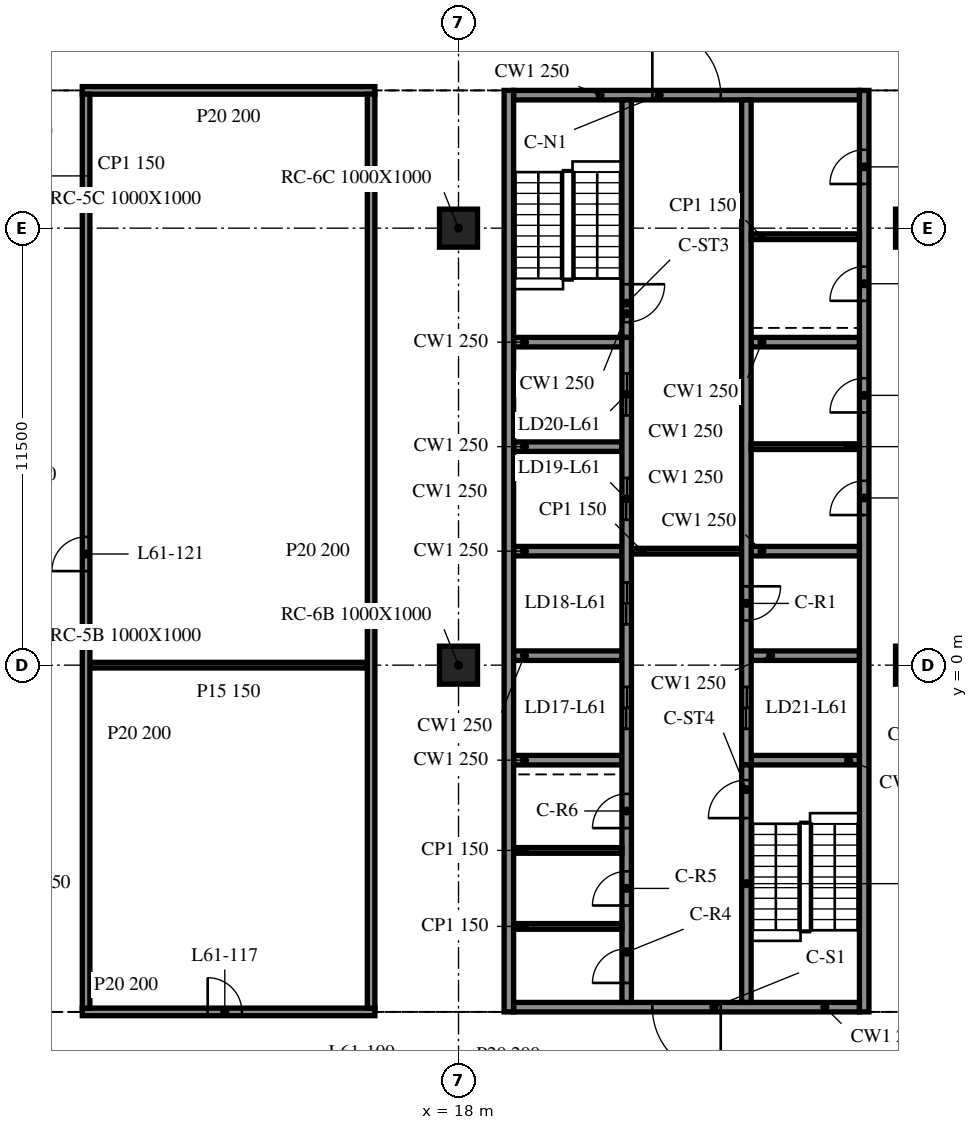
"""IFC4 building model, lengths in metres.
Left out: names, types, materials, properties, quantities, classifications, styles, units other than length and angle.
Written with IfcOpenShell. Run it as: python <this file> out.ifc"""

import sys

from ifc_helpers import new_model, si_unit, direction, frame, frame_2d, origin, origin_2d, place, context, subcontext, project, spatial, rectangle, extrude, element, fill, save


model = new_model("IFC4")
c1 = context("Model", 3, precision=1e-05, world=origin(), true_north=direction((0.0, 1.0)))
c2 = subcontext(c1, "Body", "Model", "MODEL_VIEW")
j1 = project(units=[si_unit("LENGTHUNIT", "METRE"), si_unit("PLANEANGLEUNIT", "RADIAN")], contexts=[c1])
p1 = place(None, origin())
s1 = spatial("IfcSite", under=j1, at=p1, CompositionType="ELEMENT")
p2 = place(p1, origin())
s2 = spatial("IfcBuilding", under=s1, at=p2, CompositionType="ELEMENT")
p3 = place(p2, frame((0.0, 0.0, 251.4)))
s3 = spatial("IfcBuildingStorey", under=s2, at=p3, CompositionType="ELEMENT", Elevation=251.4)
for number, where, z_axis, x_axis in (
    (1, (18.0, 0.0, -0.34), (0.0, 0.0, 1.0), (1.0, 0.0, 0.0)),
    (2, (18.0, 11.5, -0.34), (0.0, 0.0, 1.0), (1.0, 0.0, 0.0)),
    (3, (30.0, 0.0, -0.34), (0.0, 0.0, 1.0), (1.0, 0.0, 0.0)),
    (4, (30.0, 11.5, -0.34), (0.0, 0.0, 1.0), (1.0, 0.0, 0.0)),
):
    element("IfcColumn", number, at=place(p3, frame(where, z_axis=z_axis, x_axis=x_axis)), inside=s3, PredefinedType="COLUMN", context=c2, shape_type="SweptSolid", body=[
        extrude(rectangle(XDim=1.0, YDim=1.0, at=origin_2d()), origin(), (0.0, 0.0, 1.0), 3.8),
    ])
p4 = place(p3, frame((19.325, 15.125, 0.0), z_axis=(0.0, 0.0, 1.0), x_axis=(0.0, -1.0, 0.0)))
e5 = element("IfcWall", 5, at=p4, inside=s3, PredefinedType="SOLIDWALL", context=c2, shape_type="SweptSolid", body=[
    extrude(rectangle(XDim=24.25, YDim=0.25, at=frame_2d((12.125, 0.0))), origin(), (0.0, 0.0, 1.0), 3.46),
])
p5 = place(p3, frame((28.675, -9.125, 0.0), z_axis=(0.0, 0.0, 1.0), x_axis=(0.0, 1.0, 0.0)))
e6 = element("IfcWall", 6, at=p5, inside=s3, PredefinedType="SOLIDWALL", context=c2, shape_type="SweptSolid", body=[
    extrude(rectangle(XDim=24.25, YDim=0.25, at=frame_2d((12.125, 0.0))), origin(), (0.0, 0.0, 1.0), 3.46),
])
p6 = place(p5, frame((13.075, 0.0, 0.0)))
e7 = element("IfcOpeningElement", 7, at=p6, cuts=e6, PredefinedType="OPENING", context=c2, shape_type="SweptSolid", body=[
    extrude(rectangle(XDim=0.9, YDim=2.1, at=frame_2d((0.45, 1.05))), frame((0.0, 0.135, 0.0), z_axis=(0.0, -1.0, 0.0), x_axis=(1.0, 0.0, 0.0)), (0.0, 0.0, 1.0), 0.27),
])
p7 = place(p5, frame((15.775, 0.0, 0.0)))
e8 = element("IfcOpeningElement", 8, at=p7, cuts=e6, PredefinedType="OPENING", context=c2, shape_type="SweptSolid", body=[
    extrude(rectangle(XDim=0.9, YDim=2.1, at=frame_2d((0.45, 1.05))), frame((0.0, 0.135, 0.0), z_axis=(0.0, -1.0, 0.0), x_axis=(1.0, 0.0, 0.0)), (0.0, 0.0, 1.0), 0.27),
])
p8 = place(p5, frame((18.712, 0.0, 0.0)))
e9 = element("IfcOpeningElement", 9, at=p8, cuts=e6, PredefinedType="OPENING", context=c2, shape_type="SweptSolid", body=[
    extrude(rectangle(XDim=0.9, YDim=2.1, at=frame_2d((0.45, 1.05))), frame((0.0, 0.135, 0.0), z_axis=(0.0, -1.0, 0.0), x_axis=(1.0, 0.0, 0.0)), (0.0, 0.0, 1.0), 0.27),
])
p9 = place(p5, frame((21.788, 0.0, 0.0)))
e10 = element("IfcOpeningElement", 10, at=p9, cuts=e6, PredefinedType="OPENING", context=c2, shape_type="SweptSolid", body=[
    extrude(rectangle(XDim=0.9, YDim=2.1, at=frame_2d((0.45, 1.05))), frame((0.0, 0.135, 0.0), z_axis=(0.0, -1.0, 0.0), x_axis=(1.0, 0.0, 0.0)), (0.0, 0.0, 1.0), 0.27),
])
p10 = place(p3, frame((28.55, -9.0, 0.0), z_axis=(0.0, 0.0, 1.0), x_axis=(-1.0, 0.0, 0.0)))
e11 = element("IfcWall", 11, at=p10, inside=s3, PredefinedType="SOLIDWALL", context=c2, shape_type="SweptSolid", body=[
    extrude(rectangle(XDim=9.1, YDim=0.25, at=frame_2d((4.55, 0.0))), origin(), (0.0, 0.0, 1.0), 3.46),
])
p11 = place(p10, frame((3.65, 0.0, 0.0)))
e12 = element("IfcOpeningElement", 12, at=p11, cuts=e11, PredefinedType="OPENING", context=c2, shape_type="SweptSolid", body=[
    extrude(rectangle(XDim=1.8, YDim=2.1, at=frame_2d((0.9, 1.05))), frame((0.0, 0.135, 0.0), z_axis=(0.0, -1.0, 0.0), x_axis=(1.0, 0.0, 0.0)), (0.0, 0.0, 1.0), 0.27),
])
p12 = place(p3, frame((19.45, 15.0, 0.0), z_axis=(0.0, 0.0, 1.0), x_axis=(1.0, 0.0, 0.0)))
e13 = element("IfcWall", 13, at=p12, inside=s3, PredefinedType="SOLIDWALL", context=c2, shape_type="SweptSolid", body=[
    extrude(rectangle(XDim=9.1, YDim=0.25, at=frame_2d((4.55, 0.0))), origin(), (0.0, 0.0, 1.0), 3.46),
])
p13 = place(p12, frame((3.65, 0.0, 0.0)))
e14 = element("IfcOpeningElement", 14, at=p13, cuts=e13, PredefinedType="OPENING", context=c2, shape_type="SweptSolid", body=[
    extrude(rectangle(XDim=1.8, YDim=2.1, at=frame_2d((0.9, 1.05))), frame((0.0, 0.135, 0.0), z_axis=(0.0, -1.0, 0.0), x_axis=(1.0, 0.0, 0.0)), (0.0, 0.0, 1.0), 0.27),
])
p14 = place(p3, frame((22.425, -8.875, 0.0), z_axis=(0.0, 0.0, 1.0), x_axis=(0.0, 1.0, 0.0)))
e15 = element("IfcWall", 15, at=p14, inside=s3, PredefinedType="SOLIDWALL", context=c2, shape_type="SweptSolid", body=[
    extrude(rectangle(XDim=17.5, YDim=0.25, at=frame_2d((8.75, 0.0))), origin(), (0.0, 0.0, 1.0), 3.46),
])
p15 = place(p14, frame((7.2, 0.0, 0.0)))
e16 = element("IfcOpeningElement", 16, at=p15, cuts=e15, PredefinedType="OPENING", context=c2, shape_type="SweptSolid", body=[
    extrude(rectangle(XDim=1.1, YDim=2.1, at=frame_2d((0.55, 1.05))), frame((0.0, 0.135, 0.0), z_axis=(0.0, -1.0, 0.0), x_axis=(1.0, 0.0, 0.0)), (0.0, 0.0, 1.0), 0.27),
])
p16 = place(p14, frame((9.95, 0.0, 0.0)))
e17 = element("IfcOpeningElement", 17, at=p16, cuts=e15, PredefinedType="OPENING", context=c2, shape_type="SweptSolid", body=[
    extrude(rectangle(XDim=1.1, YDim=2.1, at=frame_2d((0.55, 1.05))), frame((0.0, 0.135, 0.0), z_axis=(0.0, -1.0, 0.0), x_axis=(1.0, 0.0, 0.0)), (0.0, 0.0, 1.0), 0.27),
])
p17 = place(p14, frame((12.7, 0.0, 0.0)))
e18 = element("IfcOpeningElement", 18, at=p17, cuts=e15, PredefinedType="OPENING", context=c2, shape_type="SweptSolid", body=[
    extrude(rectangle(XDim=1.1, YDim=2.1, at=frame_2d((0.55, 1.05))), frame((0.0, 0.135, 0.0), z_axis=(0.0, -1.0, 0.0), x_axis=(1.0, 0.0, 0.0)), (0.0, 0.0, 1.0), 0.27),
])
p18 = place(p14, frame((15.45, 0.0, 0.0)))
e19 = element("IfcOpeningElement", 19, at=p18, cuts=e15, PredefinedType="OPENING", context=c2, shape_type="SweptSolid", body=[
    extrude(rectangle(XDim=1.1, YDim=2.1, at=frame_2d((0.55, 1.05))), frame((0.0, 0.135, 0.0), z_axis=(0.0, -1.0, 0.0), x_axis=(1.0, 0.0, 0.0)), (0.0, 0.0, 1.0), 0.27),
])
p19 = place(p14, frame((0.512, 0.0, 0.0)))
e20 = element("IfcOpeningElement", 20, at=p19, cuts=e15, PredefinedType="OPENING", context=c2, shape_type="SweptSolid", body=[
    extrude(rectangle(XDim=0.9, YDim=2.1, at=frame_2d((0.45, 1.05))), frame((0.0, 0.135, 0.0), z_axis=(0.0, -1.0, 0.0), x_axis=(1.0, 0.0, 0.0)), (0.0, 0.0, 1.0), 0.27),
])
p20 = place(p14, frame((2.55, 0.0, 0.0)))
e21 = element("IfcOpeningElement", 21, at=p20, cuts=e15, PredefinedType="OPENING", context=c2, shape_type="SweptSolid", body=[
    extrude(rectangle(XDim=0.9, YDim=2.1, at=frame_2d((0.45, 1.05))), frame((0.0, 0.135, 0.0), z_axis=(0.0, -1.0, 0.0), x_axis=(1.0, 0.0, 0.0)), (0.0, 0.0, 1.0), 0.27),
])
p21 = place(p14, frame((4.587, 0.0, 0.0)))
e22 = element("IfcOpeningElement", 22, at=p21, cuts=e15, PredefinedType="OPENING", context=c2, shape_type="SweptSolid", body=[
    extrude(rectangle(XDim=0.9, YDim=2.1, at=frame_2d((0.45, 1.05))), frame((0.0, 0.135, 0.0), z_axis=(0.0, -1.0, 0.0), x_axis=(1.0, 0.0, 0.0)), (0.0, 0.0, 1.0), 0.27),
])
p22 = place(p3, frame((22.425, 14.875, 0.0), z_axis=(0.0, 0.0, 1.0), x_axis=(0.0, -1.0, 0.0)))
e23 = element("IfcWall", 23, at=p22, inside=s3, PredefinedType="SOLIDWALL", context=c2, shape_type="SweptSolid", body=[
    extrude(rectangle(XDim=6.25, YDim=0.25, at=frame_2d((3.125, 0.0))), origin(), (0.0, 0.0, 1.0), 3.46),
])
p23 = place(p22, frame((4.85, 0.0, 0.0)))
e24 = element("IfcOpeningElement", 24, at=p23, cuts=e23, PredefinedType="OPENING", context=c2, shape_type="SweptSolid", body=[
    extrude(rectangle(XDim=1.0, YDim=2.1, at=frame_2d((0.5, 1.05))), frame((0.0, 0.135, 0.0), z_axis=(0.0, -1.0, 0.0), x_axis=(1.0, 0.0, 0.0)), (0.0, 0.0, 1.0), 0.27),
])
p24 = place(p3, frame((25.575, -8.875, 0.0), z_axis=(0.0, 0.0, 1.0), x_axis=(0.0, 1.0, 0.0)))
e25 = element("IfcWall", 25, at=p24, inside=s3, PredefinedType="SOLIDWALL", context=c2, shape_type="SweptSolid", body=[
    extrude(rectangle(XDim=6.25, YDim=0.25, at=frame_2d((3.125, 0.0))), origin(), (0.0, 0.0, 1.0), 3.46),
])
p25 = place(p24, frame((4.85, 0.0, 0.0)))
e26 = element("IfcOpeningElement", 26, at=p25, cuts=e25, PredefinedType="OPENING", context=c2, shape_type="SweptSolid", body=[
    extrude(rectangle(XDim=1.0, YDim=2.1, at=frame_2d((0.5, 1.05))), frame((0.0, 0.135, 0.0), z_axis=(0.0, -1.0, 0.0), x_axis=(1.0, 0.0, 0.0)), (0.0, 0.0, 1.0), 0.27),
])
p26 = place(p3, frame((25.575, 14.875, 0.0), z_axis=(0.0, 0.0, 1.0), x_axis=(0.0, -1.0, 0.0)))
e27 = element("IfcWall", 27, at=p26, inside=s3, PredefinedType="SOLIDWALL", context=c2, shape_type="SweptSolid", body=[
    extrude(rectangle(XDim=17.5, YDim=0.25, at=frame_2d((8.75, 0.0))), origin(), (0.0, 0.0, 1.0), 3.46),
])
p27 = place(p26, frame((15.45, 0.0, 0.0)))
e28 = element("IfcOpeningElement", 28, at=p27, cuts=e27, PredefinedType="OPENING", context=c2, shape_type="SweptSolid", body=[
    extrude(rectangle(XDim=1.1, YDim=2.1, at=frame_2d((0.55, 1.05))), frame((0.0, 0.135, 0.0), z_axis=(0.0, -1.0, 0.0), x_axis=(1.0, 0.0, 0.0)), (0.0, 0.0, 1.0), 0.27),
])
p28 = place(p26, frame((12.8, 0.0, 0.0)))
e29 = element("IfcOpeningElement", 29, at=p28, cuts=e27, PredefinedType="OPENING", context=c2, shape_type="SweptSolid", body=[
    extrude(rectangle(XDim=0.9, YDim=2.1, at=frame_2d((0.45, 1.05))), frame((0.0, 0.135, 0.0), z_axis=(0.0, -1.0, 0.0), x_axis=(1.0, 0.0, 0.0)), (0.0, 0.0, 1.0), 0.27),
])
for number, where, z_axis, x_axis in (
    (30, (19.45, -2.5, 0.0), (0.0, 0.0, 1.0), (1.0, 0.0, 0.0)),
    (31, (19.45, 0.25, 0.0), (0.0, 0.0, 1.0), (1.0, 0.0, 0.0)),
    (32, (19.45, 3.0, 0.0), (0.0, 0.0, 1.0), (1.0, 0.0, 0.0)),
    (33, (19.45, 5.75, 0.0), (0.0, 0.0, 1.0), (1.0, 0.0, 0.0)),
    (34, (19.45, 8.5, 0.0), (0.0, 0.0, 1.0), (1.0, 0.0, 0.0)),
    (35, (25.7, -2.5, 0.0), (0.0, 0.0, 1.0), (1.0, 0.0, 0.0)),
    (36, (25.7, 0.25, 0.0), (0.0, 0.0, 1.0), (1.0, 0.0, 0.0)),
    (37, (25.7, 3.0, 0.0), (0.0, 0.0, 1.0), (1.0, 0.0, 0.0)),
    (38, (25.7, 8.5, 0.0), (0.0, 0.0, 1.0), (1.0, 0.0, 0.0)),
):
    element("IfcWall", number, at=place(p3, frame(where, z_axis=z_axis, x_axis=x_axis)), inside=s3, PredefinedType="SOLIDWALL", context=c2, shape_type="SweptSolid", body=[
        extrude(rectangle(XDim=2.85, YDim=0.25, at=frame_2d((1.425, 0.0))), origin(), (0.0, 0.0, 1.0), 3.46),
    ])
p29 = place(p3, frame((22.55, 3.0, 0.0), z_axis=(0.0, 0.0, 1.0), x_axis=(1.0, 0.0, 0.0)))
e39 = element("IfcWall", 39, at=p29, inside=s3, PredefinedType="PARTITIONING", context=c2, shape_type="SweptSolid", body=[
    extrude(rectangle(XDim=2.9, YDim=0.15, at=frame_2d((1.45, 0.0))), origin(), (0.0, 0.0, 1.0), 3.46),
])
for number, where, z_axis, x_axis in (
    (40, (25.7, 5.75, 0.0), (0.0, 0.0, 1.0), (1.0, 0.0, 0.0)),
    (41, (19.45, -6.875, 0.0), (0.0, 0.0, 1.0), (1.0, 0.0, 0.0)),
    (42, (19.45, -4.875, 0.0), (0.0, 0.0, 1.0), (1.0, 0.0, 0.0)),
    (43, (25.7, 11.275, 0.0), (0.0, 0.0, 1.0), (1.0, 0.0, 0.0)),
):
    element("IfcWall", number, at=place(p3, frame(where, z_axis=z_axis, x_axis=x_axis)), inside=s3, PredefinedType="PARTITIONING", context=c2, shape_type="SweptSolid", body=[
        extrude(rectangle(XDim=2.85, YDim=0.15, at=frame_2d((1.425, 0.0))), origin(), (0.0, 0.0, 1.0), 3.46),
    ])
p30 = place(p3, frame((8.1, -9.125, 0.0), z_axis=(0.0, 0.0, 1.0), x_axis=(1.0, 0.0, 0.0)))
e44 = element("IfcWall", 44, at=p30, inside=s3, PredefinedType="PARTITIONING", context=c2, shape_type="SweptSolid", body=[
    extrude(rectangle(XDim=7.7, YDim=0.2, at=frame_2d((3.85, 0.0))), origin(), (0.0, 0.0, 1.0), 3.46),
])
p31 = place(p30, frame((3.3, 0.0, 0.0)))
e45 = element("IfcOpeningElement", 45, at=p31, cuts=e44, PredefinedType="OPENING", context=c2, shape_type="SweptSolid", body=[
    extrude(rectangle(XDim=0.9, YDim=2.1, at=frame_2d((0.45, 1.05))), frame((0.0, 0.11, 0.0), z_axis=(0.0, -1.0, 0.0), x_axis=(1.0, 0.0, 0.0)), (0.0, 0.0, 1.0), 0.22),
])
p32 = place(p3, frame((8.3, 0.0, 0.0), z_axis=(0.0, 0.0, 1.0), x_axis=(1.0, 0.0, 0.0)))
e46 = element("IfcWall", 46, at=p32, inside=s3, PredefinedType="PARTITIONING", context=c2, shape_type="SweptSolid", body=[
    extrude(rectangle(XDim=7.3, YDim=0.15, at=frame_2d((3.65, 0.0))), origin(), (0.0, 0.0, 1.0), 3.46),
])
p33 = place(p3, frame((8.1, 15.125, 0.0), z_axis=(0.0, 0.0, 1.0), x_axis=(1.0, 0.0, 0.0)))
e47 = element("IfcWall", 47, at=p33, inside=s3, PredefinedType="PARTITIONING", context=c2, shape_type="SweptSolid", body=[
    extrude(rectangle(XDim=7.7, YDim=0.2, at=frame_2d((3.85, 0.0))), origin(), (0.0, 0.0, 1.0), 3.46),
])
p34 = place(p3, frame((8.2, -9.025, 0.0), z_axis=(0.0, 0.0, 1.0), x_axis=(0.0, 1.0, 0.0)))
e48 = element("IfcWall", 48, at=p34, inside=s3, PredefinedType="PARTITIONING", context=c2, shape_type="SweptSolid", body=[
    extrude(rectangle(XDim=24.05, YDim=0.2, at=frame_2d((12.025, 0.0))), origin(), (0.0, 0.0, 1.0), 3.46),
])
p35 = place(p34, frame((11.5, 0.0, 0.0)))
e49 = element("IfcOpeningElement", 49, at=p35, cuts=e48, PredefinedType="OPENING", context=c2, shape_type="SweptSolid", body=[
    extrude(rectangle(XDim=0.9, YDim=2.1, at=frame_2d((0.45, 1.05))), frame((0.0, 0.11, 0.0), z_axis=(0.0, -1.0, 0.0), x_axis=(1.0, 0.0, 0.0)), (0.0, 0.0, 1.0), 0.22),
])
p36 = place(p3, frame((15.7, -9.025, 0.0), z_axis=(0.0, 0.0, 1.0), x_axis=(0.0, 1.0, 0.0)))
e50 = element("IfcWall", 50, at=p36, inside=s3, PredefinedType="PARTITIONING", context=c2, shape_type="SweptSolid", body=[
    extrude(rectangle(XDim=24.05, YDim=0.2, at=frame_2d((12.025, 0.0))), origin(), (0.0, 0.0, 1.0), 3.46),
])
p37 = place(p11, origin())
e51 = element("IfcDoor", 51, at=p37, inside=s3, OperationType="DOUBLE_DOOR_SINGLE_SWING", PredefinedType="DOOR", context=c2, shape_type="SweptSolid", body=[
    extrude(rectangle(XDim=1.8, YDim=2.1, at=frame_2d((0.9, 1.05))), frame((0.0, 0.025, 0.0), z_axis=(0.0, -1.0, 0.0), x_axis=(1.0, 0.0, 0.0)), (0.0, 0.0, 1.0), 0.05),
])
fill(e12, e51)
p38 = place(p13, origin())
e52 = element("IfcDoor", 52, at=p38, inside=s3, OperationType="DOUBLE_DOOR_SINGLE_SWING", PredefinedType="DOOR", context=c2, shape_type="SweptSolid", body=[
    extrude(rectangle(XDim=1.8, YDim=2.1, at=frame_2d((0.9, 1.05))), frame((0.0, 0.025, 0.0), z_axis=(0.0, -1.0, 0.0), x_axis=(1.0, 0.0, 0.0)), (0.0, 0.0, 1.0), 0.05),
])
fill(e14, e52)
p39 = place(p27, origin())
e53 = element("IfcDoor", 53, at=p39, inside=s3, OperationType="DOUBLE_DOOR_SLIDING", PredefinedType="DOOR", context=c2, shape_type="SweptSolid", body=[
    extrude(rectangle(XDim=1.1, YDim=2.1, at=frame_2d((0.55, 1.05))), frame((0.0, 0.025, 0.0), z_axis=(0.0, -1.0, 0.0), x_axis=(1.0, 0.0, 0.0)), (0.0, 0.0, 1.0), 0.05),
])
fill(e28, e53)
p40 = place(p15, origin())
e54 = element("IfcDoor", 54, at=p40, inside=s3, OperationType="DOUBLE_DOOR_SLIDING", PredefinedType="DOOR", context=c2, shape_type="SweptSolid", body=[
    extrude(rectangle(XDim=1.1, YDim=2.1, at=frame_2d((0.55, 1.05))), frame((0.0, 0.025, 0.0), z_axis=(0.0, -1.0, 0.0), x_axis=(1.0, 0.0, 0.0)), (0.0, 0.0, 1.0), 0.05),
])
fill(e16, e54)
p41 = place(p16, origin())
e55 = element("IfcDoor", 55, at=p41, inside=s3, OperationType="DOUBLE_DOOR_SLIDING", PredefinedType="DOOR", context=c2, shape_type="SweptSolid", body=[
    extrude(rectangle(XDim=1.1, YDim=2.1, at=frame_2d((0.55, 1.05))), frame((0.0, 0.025, 0.0), z_axis=(0.0, -1.0, 0.0), x_axis=(1.0, 0.0, 0.0)), (0.0, 0.0, 1.0), 0.05),
])
fill(e17, e55)
p42 = place(p17, origin())
e56 = element("IfcDoor", 56, at=p42, inside=s3, OperationType="DOUBLE_DOOR_SLIDING", PredefinedType="DOOR", context=c2, shape_type="SweptSolid", body=[
    extrude(rectangle(XDim=1.1, YDim=2.1, at=frame_2d((0.55, 1.05))), frame((0.0, 0.025, 0.0), z_axis=(0.0, -1.0, 0.0), x_axis=(1.0, 0.0, 0.0)), (0.0, 0.0, 1.0), 0.05),
])
fill(e18, e56)
p43 = place(p18, origin())
e57 = element("IfcDoor", 57, at=p43, inside=s3, OperationType="DOUBLE_DOOR_SLIDING", PredefinedType="DOOR", context=c2, shape_type="SweptSolid", body=[
    extrude(rectangle(XDim=1.1, YDim=2.1, at=frame_2d((0.55, 1.05))), frame((0.0, 0.025, 0.0), z_axis=(0.0, -1.0, 0.0), x_axis=(1.0, 0.0, 0.0)), (0.0, 0.0, 1.0), 0.05),
])
fill(e19, e57)
p44 = place(p28, origin())
e58 = element("IfcDoor", 58, at=p44, inside=s3, OperationType="SINGLE_SWING_LEFT", PredefinedType="DOOR", context=c2, shape_type="SweptSolid", body=[
    extrude(rectangle(XDim=0.9, YDim=2.1, at=frame_2d((0.45, 1.05))), frame((0.0, 0.025, 0.0), z_axis=(0.0, -1.0, 0.0), x_axis=(1.0, 0.0, 0.0)), (0.0, 0.0, 1.0), 0.05),
])
fill(e29, e58)
p45 = place(p6, origin())
e59 = element("IfcDoor", 59, at=p45, inside=s3, OperationType="SINGLE_SWING_RIGHT", PredefinedType="DOOR", context=c2, shape_type="SweptSolid", body=[
    extrude(rectangle(XDim=0.9, YDim=2.1, at=frame_2d((0.45, 1.05))), frame((0.0, 0.025, 0.0), z_axis=(0.0, -1.0, 0.0), x_axis=(1.0, 0.0, 0.0)), (0.0, 0.0, 1.0), 0.05),
])
fill(e7, e59)
p46 = place(p7, origin())
e60 = element("IfcDoor", 60, at=p46, inside=s3, OperationType="SINGLE_SWING_LEFT", PredefinedType="DOOR", context=c2, shape_type="SweptSolid", body=[
    extrude(rectangle(XDim=0.9, YDim=2.1, at=frame_2d((0.45, 1.05))), frame((0.0, 0.025, 0.0), z_axis=(0.0, -1.0, 0.0), x_axis=(1.0, 0.0, 0.0)), (0.0, 0.0, 1.0), 0.05),
])
fill(e8, e60)
p47 = place(p19, origin())
e61 = element("IfcDoor", 61, at=p47, inside=s3, OperationType="SINGLE_SWING_RIGHT", PredefinedType="DOOR", context=c2, shape_type="SweptSolid", body=[
    extrude(rectangle(XDim=0.9, YDim=2.1, at=frame_2d((0.45, 1.05))), frame((0.0, 0.025, 0.0), z_axis=(0.0, -1.0, 0.0), x_axis=(1.0, 0.0, 0.0)), (0.0, 0.0, 1.0), 0.05),
])
fill(e20, e61)
p48 = place(p20, origin())
e62 = element("IfcDoor", 62, at=p48, inside=s3, OperationType="SINGLE_SWING_LEFT", PredefinedType="DOOR", context=c2, shape_type="SweptSolid", body=[
    extrude(rectangle(XDim=0.9, YDim=2.1, at=frame_2d((0.45, 1.05))), frame((0.0, 0.025, 0.0), z_axis=(0.0, -1.0, 0.0), x_axis=(1.0, 0.0, 0.0)), (0.0, 0.0, 1.0), 0.05),
])
fill(e21, e62)
p49 = place(p21, origin())
e63 = element("IfcDoor", 63, at=p49, inside=s3, OperationType="SINGLE_SWING_RIGHT", PredefinedType="DOOR", context=c2, shape_type="SweptSolid", body=[
    extrude(rectangle(XDim=0.9, YDim=2.1, at=frame_2d((0.45, 1.05))), frame((0.0, 0.025, 0.0), z_axis=(0.0, -1.0, 0.0), x_axis=(1.0, 0.0, 0.0)), (0.0, 0.0, 1.0), 0.05),
])
fill(e22, e63)
p50 = place(p8, origin())
e64 = element("IfcDoor", 64, at=p50, inside=s3, OperationType="SINGLE_SWING_LEFT", PredefinedType="DOOR", context=c2, shape_type="SweptSolid", body=[
    extrude(rectangle(XDim=0.9, YDim=2.1, at=frame_2d((0.45, 1.05))), frame((0.0, 0.025, 0.0), z_axis=(0.0, -1.0, 0.0), x_axis=(1.0, 0.0, 0.0)), (0.0, 0.0, 1.0), 0.05),
])
fill(e9, e64)
p51 = place(p9, origin())
e65 = element("IfcDoor", 65, at=p51, inside=s3, OperationType="SINGLE_SWING_RIGHT", PredefinedType="DOOR", context=c2, shape_type="SweptSolid", body=[
    extrude(rectangle(XDim=0.9, YDim=2.1, at=frame_2d((0.45, 1.05))), frame((0.0, 0.025, 0.0), z_axis=(0.0, -1.0, 0.0), x_axis=(1.0, 0.0, 0.0)), (0.0, 0.0, 1.0), 0.05),
])
fill(e10, e65)
p52 = place(p23, origin())
e66 = element("IfcDoor", 66, at=p52, inside=s3, OperationType="SINGLE_SWING_LEFT", PredefinedType="DOOR", context=c2, shape_type="SweptSolid", body=[
    extrude(rectangle(XDim=1.0, YDim=2.1, at=frame_2d((0.5, 1.05))), frame((0.0, 0.025, 0.0), z_axis=(0.0, -1.0, 0.0), x_axis=(1.0, 0.0, 0.0)), (0.0, 0.0, 1.0), 0.05),
])
fill(e24, e66)
p53 = place(p25, origin())
e67 = element("IfcDoor", 67, at=p53, inside=s3, OperationType="SINGLE_SWING_RIGHT", PredefinedType="DOOR", context=c2, shape_type="SweptSolid", body=[
    extrude(rectangle(XDim=1.0, YDim=2.1, at=frame_2d((0.5, 1.05))), frame((0.0, 0.025, 0.0), z_axis=(0.0, -1.0, 0.0), x_axis=(1.0, 0.0, 0.0)), (0.0, 0.0, 1.0), 0.05),
])
fill(e26, e67)
p54 = place(p31, origin())
e68 = element("IfcDoor", 68, at=p54, inside=s3, OperationType="SINGLE_SWING_LEFT", PredefinedType="DOOR", context=c2, shape_type="SweptSolid", body=[
    extrude(rectangle(XDim=0.9, YDim=2.1, at=frame_2d((0.45, 1.05))), frame((0.0, 0.025, 0.0), z_axis=(0.0, -1.0, 0.0), x_axis=(1.0, 0.0, 0.0)), (0.0, 0.0, 1.0), 0.05),
])
fill(e45, e68)
p55 = place(p35, origin())
e69 = element("IfcDoor", 69, at=p55, inside=s3, OperationType="SINGLE_SWING_RIGHT", PredefinedType="DOOR", context=c2, shape_type="SweptSolid", body=[
    extrude(rectangle(XDim=0.9, YDim=2.1, at=frame_2d((0.45, 1.05))), frame((0.0, 0.025, 0.0), z_axis=(0.0, -1.0, 0.0), x_axis=(1.0, 0.0, 0.0)), (0.0, 0.0, 1.0), 0.05),
])
fill(e49, e69)
save(model, sys.argv[1])
